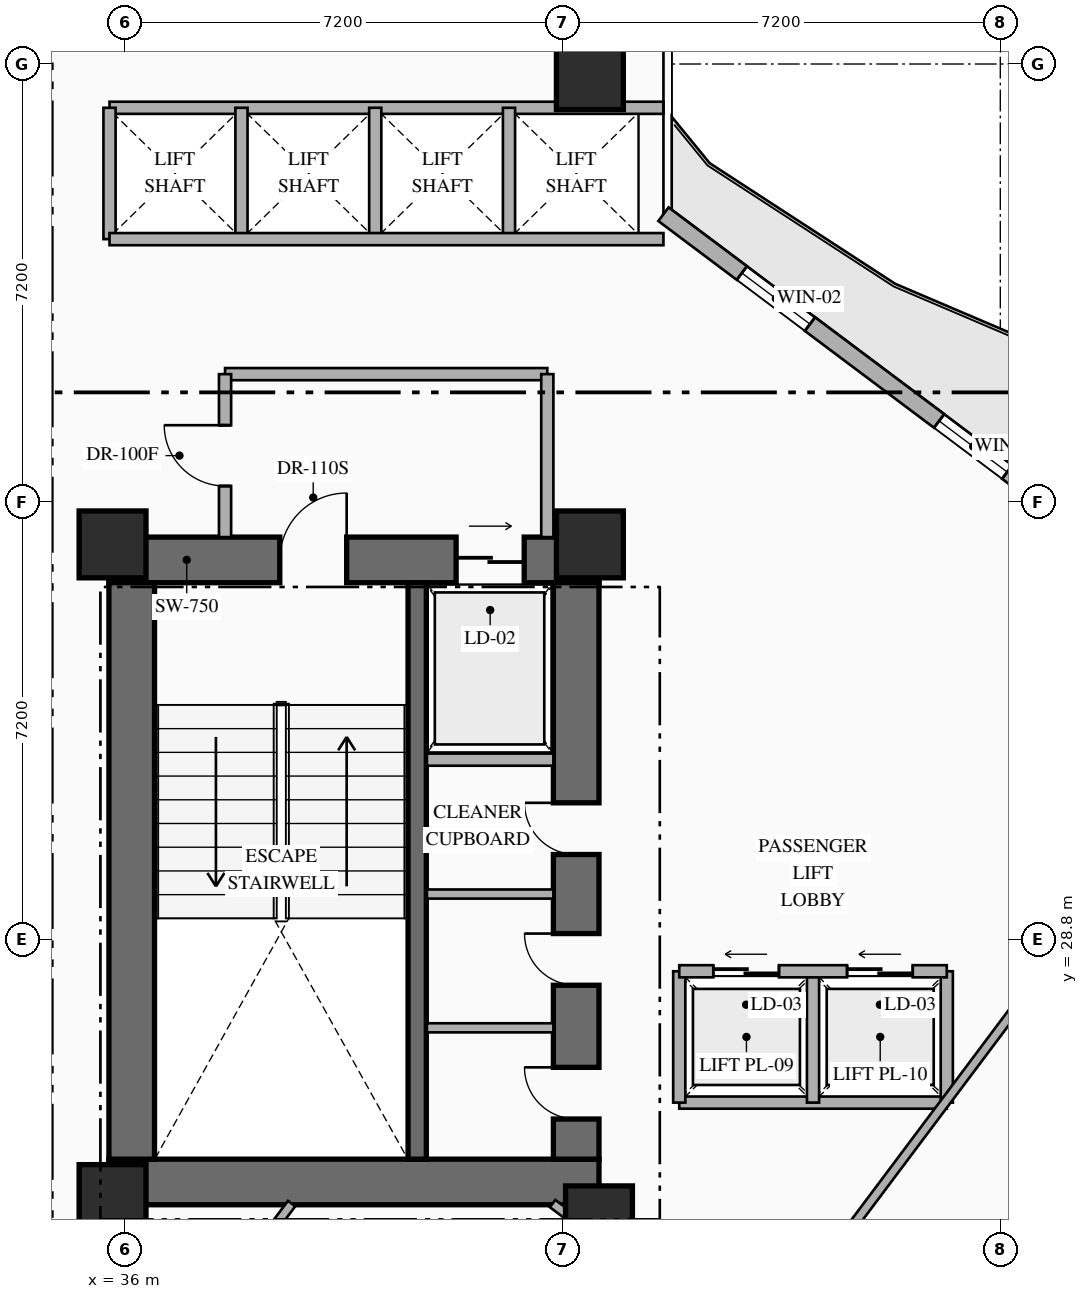
"""IFC4 building model, lengths in metres.
Left out: names, types, materials, properties, quantities, classifications, styles, units other than length and angle.
Written with IfcOpenShell. Run it as: python <this file> out.ifc"""

import sys

from ifc_helpers import new_model, si_unit, direction, frame, frame_2d, origin, origin_2d, place, context, subcontext, project, spatial, rectangle, extrude, element, fill, save


model = new_model("IFC4")
c1 = context("Model", 3, precision=1e-05, world=origin(), true_north=direction((0.0, 1.0)))
c2 = subcontext(c1, "Body", "Model", "MODEL_VIEW")
j1 = project(units=[si_unit("LENGTHUNIT", "METRE"), si_unit("PLANEANGLEUNIT", "RADIAN")], contexts=[c1])
p1 = place(None, origin())
s1 = spatial("IfcSite", under=j1, at=p1, CompositionType="ELEMENT")
p2 = place(p1, origin())
s2 = spatial("IfcBuilding", under=s1, at=p2, CompositionType="ELEMENT")
p3 = place(p2, frame((0.0, 0.0, 39.95)))
s3 = spatial("IfcBuildingStorey", under=s2, at=p3, CompositionType="ELEMENT", Elevation=39.95)
p4 = place(p3, frame((35.74, 24.815, 0.0), z_axis=(0.0, 0.0, 1.0), x_axis=(1.0, 0.0, 0.0)))
e1 = element("IfcWall", 1, at=p4, inside=s3, PredefinedType="SHEAR", context=c2, shape_type="SweptSolid", body=[
    extrude(rectangle(XDim=8.06, YDim=0.75, at=frame_2d((4.03, 0.0))), origin(), (0.0, 0.0, 1.0), 3.35),
])
p5 = place(p3, frame((35.74, 35.045, 0.0), z_axis=(0.0, 0.0, 1.0), x_axis=(1.0, 0.0, 0.0)))
e2 = element("IfcWall", 2, at=p5, inside=s3, PredefinedType="SHEAR", context=c2, shape_type="SweptSolid", body=[
    extrude(rectangle(XDim=8.06, YDim=0.75, at=frame_2d((4.03, 0.0))), origin(), (0.0, 0.0, 1.0), 3.35),
])
p6 = place(p5, frame((2.81, 0.0, 0.0)))
e3 = element("IfcOpeningElement", 3, at=p6, cuts=e2, PredefinedType="OPENING", context=c2, shape_type="SweptSolid", body=[
    extrude(rectangle(XDim=1.1, YDim=2.2, at=frame_2d((0.55, 1.1))), frame((0.0, 0.385, 0.0), z_axis=(0.0, -1.0, 0.0), x_axis=(1.0, 0.0, 0.0)), (0.0, 0.0, 1.0), 0.77),
])
p7 = place(p5, frame((5.71, 0.0, 0.0)))
e4 = element("IfcOpeningElement", 4, at=p7, cuts=e2, PredefinedType="OPENING", context=c2, shape_type="SweptSolid", body=[
    extrude(rectangle(XDim=1.12, YDim=2.15, at=frame_2d((0.56, 1.075))), frame((0.0, 0.385, 0.0), z_axis=(0.0, -1.0, 0.0), x_axis=(1.0, 0.0, 0.0)), (0.0, 0.0, 1.0), 0.77),
])
p8 = place(p3, frame((36.115, 25.19, 0.0), z_axis=(0.0, 0.0, 1.0), x_axis=(0.0, 1.0, 0.0)))
e5 = element("IfcWall", 5, at=p8, inside=s3, PredefinedType="SHEAR", context=c2, shape_type="SweptSolid", body=[
    extrude(rectangle(XDim=9.48, YDim=0.75, at=frame_2d((4.74, 0.0))), origin(), (0.0, 0.0, 1.0), 3.35),
])
p9 = place(p3, frame((43.425, 25.19, 0.0), z_axis=(0.0, 0.0, 1.0), x_axis=(0.0, 1.0, 0.0)))
e6 = element("IfcWall", 6, at=p9, inside=s3, PredefinedType="SHEAR", context=c2, shape_type="SweptSolid", body=[
    extrude(rectangle(XDim=9.48, YDim=0.75, at=frame_2d((4.74, 0.0))), origin(), (0.0, 0.0, 1.0), 3.35),
])
p10 = place(p9, frame((0.66, 0.0, 0.0)))
e7 = element("IfcOpeningElement", 7, at=p10, cuts=e6, PredefinedType="OPENING", context=c2, shape_type="SweptSolid", body=[
    extrude(rectangle(XDim=0.85, YDim=2.08, at=frame_2d((0.425, 1.04))), frame((0.0, 0.385, 0.0), z_axis=(0.0, -1.0, 0.0), x_axis=(1.0, 0.0, 0.0)), (0.0, 0.0, 1.0), 0.77),
])
p11 = place(p9, frame((2.86, 0.0, 0.0)))
e8 = element("IfcOpeningElement", 8, at=p11, cuts=e6, PredefinedType="OPENING", context=c2, shape_type="SweptSolid", body=[
    extrude(rectangle(XDim=0.85, YDim=2.08, at=frame_2d((0.425, 1.04))), frame((0.0, 0.385, 0.0), z_axis=(0.0, -1.0, 0.0), x_axis=(1.0, 0.0, 0.0)), (0.0, 0.0, 1.0), 0.77),
])
p12 = place(p9, frame((5.01, 0.0, 0.0)))
e9 = element("IfcOpeningElement", 9, at=p12, cuts=e6, PredefinedType="OPENING", context=c2, shape_type="SweptSolid", body=[
    extrude(rectangle(XDim=0.85, YDim=2.08, at=frame_2d((0.425, 1.04))), frame((0.0, 0.385, 0.0), z_axis=(0.0, -1.0, 0.0), x_axis=(1.0, 0.0, 0.0)), (0.0, 0.0, 1.0), 0.77),
])
p13 = place(p3, frame((40.81, 25.19, 0.0), z_axis=(0.0, 0.0, 1.0), x_axis=(0.0, 1.0, 0.0)))
e10 = element("IfcWall", 10, at=p13, inside=s3, PredefinedType="SHEAR", context=c2, shape_type="SweptSolid", body=[
    extrude(rectangle(XDim=9.48, YDim=0.3, at=frame_2d((4.74, 0.0))), origin(), (0.0, 0.0, 1.0), 3.35),
])
for number, where, z_axis, x_axis in (
    (11, (35.8, 24.55, 0.0), (0.0, 0.0, 1.0), (1.0, 0.0, 0.0)),
    (12, (43.8, 24.2, 0.0), (0.0, 0.0, 1.0), (1.0, 0.0, 0.0)),
    (13, (35.8, 35.3, 0.0), (0.0, 0.0, 1.0), (1.0, 0.0, 0.0)),
    (14, (43.65, 35.3, 0.0), (0.0, 0.0, 1.0), (1.0, 0.0, 0.0)),
    (15, (43.65, 43.0, 0.0), (0.0, 0.0, 1.0), (1.0, 0.0, 0.0)),
):
    element("IfcColumn", number, at=place(p3, frame(where, z_axis=z_axis, x_axis=x_axis)), inside=s3, PredefinedType="COLUMN", context=c2, shape_type="SweptSolid", body=[
        extrude(rectangle(XDim=1.1, YDim=1.1, at=origin_2d()), origin(), (0.0, 0.0, 1.0), 3.35),
    ])
p14 = place(p3, frame((44.86, 40.73, 0.0), z_axis=(0.0, 0.0, 1.0), x_axis=(0.800006902154, -0.599990797017, 0.0)))
e16 = element("IfcWall", 16, at=p14, inside=s3, PredefinedType="STANDARD", context=c2, shape_type="SweptSolid", body=[
    extrude(rectangle(XDim=29.712, YDim=0.28, at=frame_2d((14.856, 0.0))), origin(), (0.0, 0.0, 1.0), 3.13),
])
p15 = place(p14, frame((14.249, 0.0, 0.0)))
e17 = element("IfcOpeningElement", 17, at=p15, cuts=e16, PredefinedType="OPENING", context=c2, shape_type="SweptSolid", body=[
    extrude(rectangle(XDim=1.1, YDim=2.2, at=frame_2d((0.55, 1.1))), frame((0.0, 0.15, 0.0), z_axis=(0.0, -1.0, 0.0), x_axis=(1.0, 0.0, 0.0)), (0.0, 0.0, 1.0), 0.3),
])
p16 = place(p14, frame((1.612, 0.0, 0.85)))
e18 = element("IfcOpeningElement", 18, at=p16, cuts=e16, PredefinedType="OPENING", context=c2, shape_type="SweptSolid", body=[
    extrude(rectangle(XDim=1.4, YDim=1.8, at=frame_2d((0.7, 0.9))), frame((0.0, 0.15, 0.0), z_axis=(0.0, -1.0, 0.0), x_axis=(1.0, 0.0, 0.0)), (0.0, 0.0, 1.0), 0.3),
])
p17 = place(p14, frame((5.667, 0.0, 0.85)))
e19 = element("IfcOpeningElement", 19, at=p17, cuts=e16, PredefinedType="OPENING", context=c2, shape_type="SweptSolid", body=[
    extrude(rectangle(XDim=1.4, YDim=1.8, at=frame_2d((0.7, 0.9))), frame((0.0, 0.15, 0.0), z_axis=(0.0, -1.0, 0.0), x_axis=(1.0, 0.0, 0.0)), (0.0, 0.0, 1.0), 0.3),
])
p18 = place(p14, frame((9.912, 0.0, 0.85)))
e20 = element("IfcOpeningElement", 20, at=p18, cuts=e16, PredefinedType="OPENING", context=c2, shape_type="SweptSolid", body=[
    extrude(rectangle(XDim=1.4, YDim=1.8, at=frame_2d((0.7, 0.9))), frame((0.0, 0.15, 0.0), z_axis=(0.0, -1.0, 0.0), x_axis=(1.0, 0.0, 0.0)), (0.0, 0.0, 1.0), 0.3),
])
p19 = place(p14, frame((19.743, 0.0, 0.85)))
e21 = element("IfcOpeningElement", 21, at=p19, cuts=e16, PredefinedType="OPENING", context=c2, shape_type="SweptSolid", body=[
    extrude(rectangle(XDim=1.4, YDim=1.8, at=frame_2d((0.7, 0.9))), frame((0.0, 0.15, 0.0), z_axis=(0.0, -1.0, 0.0), x_axis=(1.0, 0.0, 0.0)), (0.0, 0.0, 1.0), 0.3),
])
p20 = place(p14, frame((22.645, 0.0, 0.85)))
e22 = element("IfcOpeningElement", 22, at=p20, cuts=e16, PredefinedType="OPENING", context=c2, shape_type="SweptSolid", body=[
    extrude(rectangle(XDim=1.4, YDim=1.8, at=frame_2d((0.7, 0.9))), frame((0.0, 0.15, 0.0), z_axis=(0.0, -1.0, 0.0), x_axis=(1.0, 0.0, 0.0)), (0.0, 0.0, 1.0), 0.3),
])
p21 = place(p14, frame((26.7, 0.0, 0.85)))
e23 = element("IfcOpeningElement", 23, at=p21, cuts=e16, PredefinedType="OPENING", context=c2, shape_type="SweptSolid", body=[
    extrude(rectangle(XDim=1.4, YDim=1.8, at=frame_2d((0.7, 0.9))), frame((0.0, 0.15, 0.0), z_axis=(0.0, -1.0, 0.0), x_axis=(1.0, 0.0, 0.0)), (0.0, 0.0, 1.0), 0.3),
])
p22 = place(p3, frame((40.97, 31.76, 0.0), z_axis=(0.0, 0.0, 1.0), x_axis=(1.0, 0.0, 0.0)))
e24 = element("IfcWall", 24, at=p22, inside=s3, PredefinedType="STANDARD", context=c2, shape_type="SweptSolid", body=[
    extrude(rectangle(XDim=2.08, YDim=0.2, at=frame_2d((1.04, 0.0))), origin(), (0.0, 0.0, 1.0), 3.13),
])
for number, where, z_axis, x_axis in (
    (25, (40.97, 27.35, 0.0), (0.0, 0.0, 1.0), (1.0, 0.0, 0.0)),
    (26, (40.97, 29.55, 0.0), (0.0, 0.0, 1.0), (1.0, 0.0, 0.0)),
):
    element("IfcWall", number, at=place(p3, frame(where, z_axis=z_axis, x_axis=x_axis)), inside=s3, PredefinedType="PARTITIONING", context=c2, shape_type="SweptSolid", body=[
        extrude(rectangle(XDim=2.08, YDim=0.15, at=frame_2d((1.04, 0.0))), origin(), (0.0, 0.0, 1.0), 3.13),
    ])
p23 = place(p3, frame((37.65, 38.1, 0.0), z_axis=(0.0, 0.0, 1.0), x_axis=(1.0, 0.0, 0.0)))
e27 = element("IfcWall", 27, at=p23, inside=s3, PredefinedType="STANDARD", context=c2, shape_type="SweptSolid", body=[
    extrude(rectangle(XDim=5.3, YDim=0.2, at=frame_2d((2.65, 0.0))), origin(), (0.0, 0.0, 1.0), 3.13),
])
p24 = place(p3, frame((42.95, 35.42, 0.0), z_axis=(0.0, 0.0, 1.0), x_axis=(0.0, 1.0, 0.0)))
e28 = element("IfcWall", 28, at=p24, inside=s3, PredefinedType="STANDARD", context=c2, shape_type="SweptSolid", body=[
    extrude(rectangle(XDim=2.68, YDim=0.2, at=frame_2d((1.34, 0.0))), origin(), (0.0, 0.0, 1.0), 3.13),
])
p25 = place(p3, frame((37.65, 35.42, 0.0), z_axis=(0.0, 0.0, 1.0), x_axis=(0.0, 1.0, 0.0)))
e29 = element("IfcWall", 29, at=p25, inside=s3, PredefinedType="STANDARD", context=c2, shape_type="SweptSolid", body=[
    extrude(rectangle(XDim=2.68, YDim=0.2, at=frame_2d((1.34, 0.0))), origin(), (0.0, 0.0, 1.0), 3.13),
])
p26 = place(p25, frame((0.84, 0.0, 0.0)))
e30 = element("IfcOpeningElement", 30, at=p26, cuts=e29, PredefinedType="OPENING", context=c2, shape_type="SweptSolid", body=[
    extrude(rectangle(XDim=1.0, YDim=2.2, at=frame_2d((0.5, 1.1))), frame((0.0, 0.11, 0.0), z_axis=(0.0, -1.0, 0.0), x_axis=(1.0, 0.0, 0.0)), (0.0, 0.0, 1.0), 0.22),
])
p27 = place(p3, frame((35.75, 42.48, 0.0), z_axis=(0.0, 0.0, 1.0), x_axis=(1.0, 0.0, 0.0)))
e31 = element("IfcWall", 31, at=p27, inside=s3, PredefinedType="STANDARD", context=c2, shape_type="SweptSolid", body=[
    extrude(rectangle(XDim=9.11, YDim=0.2, at=frame_2d((4.555, 0.0))), origin(), (0.0, 0.0, 1.0), 3.13),
])
for number, where, z_axis, x_axis in (
    (32, (35.75, 40.32, 0.0), (0.0, 0.0, 1.0), (0.0, 1.0, 0.0)),
    (33, (37.92, 40.32, 0.0), (0.0, 0.0, 1.0), (0.0, 1.0, 0.0)),
    (34, (40.12, 40.32, 0.0), (0.0, 0.0, 1.0), (0.0, 1.0, 0.0)),
    (35, (42.32, 40.32, 0.0), (0.0, 0.0, 1.0), (0.0, 1.0, 0.0)),
):
    element("IfcWall", number, at=place(p3, frame(where, z_axis=z_axis, x_axis=x_axis)), inside=s3, PredefinedType="STANDARD", context=c2, shape_type="SweptSolid", body=[
        extrude(rectangle(XDim=2.16, YDim=0.2, at=frame_2d((1.08, 0.0))), origin(), (0.0, 0.0, 1.0), 3.13),
    ])
p28 = place(p3, frame((35.75, 40.32, 0.0), z_axis=(0.0, 0.0, 1.0), x_axis=(1.0, 0.0, 0.0)))
e36 = element("IfcWall", 36, at=p28, inside=s3, PredefinedType="STANDARD", context=c2, shape_type="SweptSolid", body=[
    extrude(rectangle(XDim=9.11, YDim=0.2, at=frame_2d((4.555, 0.0))), origin(), (0.0, 0.0, 1.0), 3.13),
])
p29 = place(p3, frame((45.12, 26.12, 0.0), z_axis=(0.0, 0.0, 1.0), x_axis=(1.0, 0.0, 0.0)))
e37 = element("IfcWall", 37, at=p29, inside=s3, PredefinedType="STANDARD", context=c2, shape_type="SweptSolid", body=[
    extrude(rectangle(XDim=4.4, YDim=0.2, at=frame_2d((2.2, 0.0))), origin(), (0.0, 0.0, 1.0), 3.13),
])
for number, where, z_axis, x_axis in (
    (38, (45.12, 26.12, 0.0), (0.0, 0.0, 1.0), (0.0, 1.0, 0.0)),
    (39, (49.52, 26.12, 0.0), (0.0, 0.0, 1.0), (0.0, 1.0, 0.0)),
    (40, (47.32, 26.12, 0.0), (0.0, 0.0, 1.0), (0.0, 1.0, 0.0)),
):
    element("IfcWall", number, at=place(p3, frame(where, z_axis=z_axis, x_axis=x_axis)), inside=s3, PredefinedType="STANDARD", context=c2, shape_type="SweptSolid", body=[
        extrude(rectangle(XDim=2.16, YDim=0.2, at=frame_2d((1.08, 0.0))), origin(), (0.0, 0.0, 1.0), 3.13),
    ])
p30 = place(p3, frame((45.12, 28.28, 0.0), z_axis=(0.0, 0.0, 1.0), x_axis=(1.0, 0.0, 0.0)))
e41 = element("IfcWall", 41, at=p30, inside=s3, PredefinedType="STANDARD", context=c2, shape_type="SweptSolid", body=[
    extrude(rectangle(XDim=4.4, YDim=0.2, at=frame_2d((2.2, 0.0))), origin(), (0.0, 0.0, 1.0), 3.13),
])
p31 = place(p30, frame((0.56, 0.0, 0.0)))
e42 = element("IfcOpeningElement", 42, at=p31, cuts=e41, PredefinedType="OPENING", context=c2, shape_type="SweptSolid", body=[
    extrude(rectangle(XDim=1.08, YDim=2.15, at=frame_2d((0.54, 1.075))), frame((0.0, 0.11, 0.0), z_axis=(0.0, -1.0, 0.0), x_axis=(1.0, 0.0, 0.0)), (0.0, 0.0, 1.0), 0.22),
])
p32 = place(p30, frame((2.76, 0.0, 0.0)))
e43 = element("IfcOpeningElement", 43, at=p32, cuts=e41, PredefinedType="OPENING", context=c2, shape_type="SweptSolid", body=[
    extrude(rectangle(XDim=1.08, YDim=2.15, at=frame_2d((0.54, 1.075))), frame((0.0, 0.11, 0.0), z_axis=(0.0, -1.0, 0.0), x_axis=(1.0, 0.0, 0.0)), (0.0, 0.0, 1.0), 0.22),
])
p33 = place(p3, frame((43.037, 24.46, 0.0), z_axis=(0.0, 0.0, 1.0), x_axis=(0.799971872363, -0.600037501685, 0.0)))
e44 = element("IfcWall", 44, at=p33, inside=s3, PredefinedType="PARTITIONING", context=c2, shape_type="SweptSolid", body=[
    extrude(rectangle(XDim=4.167, YDim=0.15, at=frame_2d((2.083, 0.0))), origin(), (0.0, 0.0, 1.0), 2.425),
])
p34 = place(p33, frame((2.468, 0.0, 0.0)))
e45 = element("IfcOpeningElement", 45, at=p34, cuts=e44, PredefinedType="OPENING", context=c2, shape_type="SweptSolid", body=[
    extrude(rectangle(XDim=0.95, YDim=2.15, at=frame_2d((0.475, 1.075))), frame((0.0, 0.085, 0.0), z_axis=(0.0, -1.0, 0.0), x_axis=(1.0, 0.0, 0.0)), (0.0, 0.0, 1.0), 0.17),
])
p35 = place(p3, frame((33.384, 17.312, 0.0), z_axis=(0.0, 0.0, 1.0), x_axis=(0.600008743659, 0.799993442181, 0.0)))
e46 = element("IfcWall", 46, at=p35, inside=s3, PredefinedType="PARTITIONING", context=c2, shape_type="SweptSolid", body=[
    extrude(rectangle(XDim=8.935, YDim=0.15, at=frame_2d((4.468, 0.0))), origin(), (0.0, 0.0, 1.0), 3.13),
])
p36 = place(p3, frame((47.87, 23.96, 0.0), z_axis=(0.0, 0.0, 1.0), x_axis=(0.599996617946, 0.80000253653, 0.0)))
e47 = element("IfcWall", 47, at=p36, inside=s3, PredefinedType="PARTITIONING", context=c2, shape_type="SweptSolid", body=[
    extrude(rectangle(XDim=11.55, YDim=0.15, at=frame_2d((5.775, 0.0))), origin(), (0.0, 0.0, 1.0), 3.13),
])
p37 = place(p16, origin())
e48 = element("IfcWindow", 48, at=p37, inside=s3, PartitioningType="SINGLE_PANEL", PredefinedType="WINDOW", context=c2, shape_type="SweptSolid", body=[
    extrude(rectangle(XDim=1.4, YDim=1.8, at=frame_2d((0.7, 0.9))), frame((0.0, 0.03, 0.0), z_axis=(0.0, -1.0, 0.0), x_axis=(1.0, 0.0, 0.0)), (0.0, 0.0, 1.0), 0.06),
])
fill(e18, e48)
p38 = place(p17, origin())
e49 = element("IfcWindow", 49, at=p38, inside=s3, PartitioningType="SINGLE_PANEL", PredefinedType="WINDOW", context=c2, shape_type="SweptSolid", body=[
    extrude(rectangle(XDim=1.4, YDim=1.8, at=frame_2d((0.7, 0.9))), frame((0.0, 0.03, 0.0), z_axis=(0.0, -1.0, 0.0), x_axis=(1.0, 0.0, 0.0)), (0.0, 0.0, 1.0), 0.06),
])
fill(e19, e49)
p39 = place(p6, origin())
e50 = element("IfcDoor", 50, at=p39, inside=s3, OperationType="SINGLE_SWING_RIGHT", PredefinedType="DOOR", context=c2, shape_type="SweptSolid", body=[
    extrude(rectangle(XDim=1.1, YDim=2.2, at=frame_2d((0.55, 1.1))), frame((0.0, 0.025, 0.0), z_axis=(0.0, -1.0, 0.0), x_axis=(1.0, 0.0, 0.0)), (0.0, 0.0, 1.0), 0.05),
])
fill(e3, e50)
p40 = place(p7, origin())
e51 = element("IfcDoor", 51, at=p40, inside=s3, OperationType="SLIDING_TO_RIGHT", PredefinedType="USERDEFINED", context=c2, shape_type="SweptSolid", body=[
    extrude(rectangle(XDim=1.12, YDim=2.15, at=frame_2d((0.56, 1.075))), frame((0.0, 0.025, 0.0), z_axis=(0.0, -1.0, 0.0), x_axis=(1.0, 0.0, 0.0)), (0.0, 0.0, 1.0), 0.05),
])
fill(e4, e51)
p41 = place(p10, origin())
e52 = element("IfcDoor", 52, at=p41, inside=s3, OperationType="SINGLE_SWING_RIGHT", PredefinedType="DOOR", context=c2, shape_type="SweptSolid", body=[
    extrude(rectangle(XDim=0.85, YDim=2.08, at=frame_2d((0.425, 1.04))), frame((0.0, 0.025, 0.0), z_axis=(0.0, -1.0, 0.0), x_axis=(1.0, 0.0, 0.0)), (0.0, 0.0, 1.0), 0.05),
])
fill(e7, e52)
p42 = place(p11, origin())
e53 = element("IfcDoor", 53, at=p42, inside=s3, OperationType="SINGLE_SWING_RIGHT", PredefinedType="DOOR", context=c2, shape_type="SweptSolid", body=[
    extrude(rectangle(XDim=0.85, YDim=2.08, at=frame_2d((0.425, 1.04))), frame((0.0, 0.025, 0.0), z_axis=(0.0, -1.0, 0.0), x_axis=(1.0, 0.0, 0.0)), (0.0, 0.0, 1.0), 0.05),
])
fill(e8, e53)
p43 = place(p12, origin())
e54 = element("IfcDoor", 54, at=p43, inside=s3, OperationType="SINGLE_SWING_RIGHT", PredefinedType="DOOR", context=c2, shape_type="SweptSolid", body=[
    extrude(rectangle(XDim=0.85, YDim=2.08, at=frame_2d((0.425, 1.04))), frame((0.0, 0.025, 0.0), z_axis=(0.0, -1.0, 0.0), x_axis=(1.0, 0.0, 0.0)), (0.0, 0.0, 1.0), 0.05),
])
fill(e9, e54)
p44 = place(p26, origin())
e55 = element("IfcDoor", 55, at=p44, inside=s3, OperationType="SINGLE_SWING_RIGHT", PredefinedType="DOOR", context=c2, shape_type="SweptSolid", body=[
    extrude(rectangle(XDim=1.0, YDim=2.2, at=frame_2d((0.5, 1.1))), frame((0.0, 0.025, 0.0), z_axis=(0.0, -1.0, 0.0), x_axis=(1.0, 0.0, 0.0)), (0.0, 0.0, 1.0), 0.05),
])
fill(e30, e55)
p45 = place(p31, origin())
e56 = element("IfcDoor", 56, at=p45, inside=s3, OperationType="SLIDING_TO_LEFT", PredefinedType="USERDEFINED", context=c2, shape_type="SweptSolid", body=[
    extrude(rectangle(XDim=1.08, YDim=2.15, at=frame_2d((0.54, 1.075))), frame((0.0, 0.025, 0.0), z_axis=(0.0, -1.0, 0.0), x_axis=(1.0, 0.0, 0.0)), (0.0, 0.0, 1.0), 0.05),
])
fill(e42, e56)
p46 = place(p32, origin())
e57 = element("IfcDoor", 57, at=p46, inside=s3, OperationType="SLIDING_TO_LEFT", PredefinedType="USERDEFINED", context=c2, shape_type="SweptSolid", body=[
    extrude(rectangle(XDim=1.08, YDim=2.15, at=frame_2d((0.54, 1.075))), frame((0.0, 0.025, 0.0), z_axis=(0.0, -1.0, 0.0), x_axis=(1.0, 0.0, 0.0)), (0.0, 0.0, 1.0), 0.05),
])
fill(e43, e57)
save(model, sys.argv[1])
